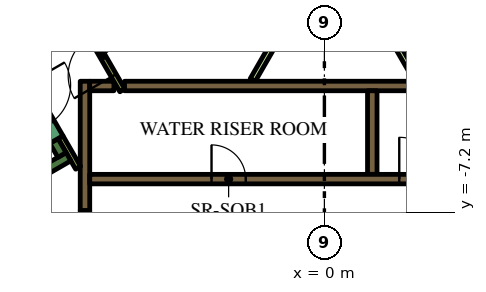
"""IFC4 building model, lengths in metres.
Left out: names, types, materials, properties, quantities, classifications, styles, units other than length and angle.
Written with IfcOpenShell. Run it as: python <this file> out.ifc"""

import sys

from ifc_helpers import new_model, si_unit, direction, frame, frame_2d, origin, place, context, subcontext, project, spatial, rectangle, extrude, element, fill, save


model = new_model("IFC4")
c1 = context("Model", 3, precision=1e-05, world=origin(), true_north=direction((0.0, 1.0)))
c2 = subcontext(c1, "Body", "Model", "MODEL_VIEW")
j1 = project(units=[si_unit("LENGTHUNIT", "METRE"), si_unit("PLANEANGLEUNIT", "RADIAN")], contexts=[c1])
p1 = place(None, origin())
s1 = spatial("IfcSite", under=j1, at=p1, CompositionType="ELEMENT")
p2 = place(p1, origin())
s2 = spatial("IfcBuilding", under=s1, at=p2, CompositionType="ELEMENT")
p3 = place(p2, frame((0.0, 0.0, 114.9)))
s3 = spatial("IfcBuildingStorey", under=s2, at=p3, CompositionType="ELEMENT", Elevation=114.9)
p4 = place(p3, frame((-12.84, -9.261, 0.0), z_axis=(0.0, 0.0, 1.0), x_axis=(0.866016039709, 0.500016218704, 0.0)))
e1 = element("IfcWall", 1, at=p4, inside=s3, PredefinedType="SOLIDWALL", context=c2, shape_type="SweptSolid", body=[
    extrude(rectangle(XDim=7.05, YDim=0.25, at=frame_2d((3.525, 0.0))), origin(), (0.0, 0.0, 1.0), 3.9),
])
p5 = place(p3, frame((-6.905, -5.69, 0.0), z_axis=(0.0, 0.0, 1.0), x_axis=(-0.500402024738, 0.865793170242, 0.0)))
e2 = element("IfcWall", 2, at=p5, inside=s3, PredefinedType="SOLIDWALL", context=c2, shape_type="SweptSolid", body=[
    extrude(rectangle(XDim=0.425, YDim=0.25, at=frame_2d((0.212, 0.0))), origin(), (0.0, 0.0, 1.0), 3.9),
])
p6 = place(p3, frame((-5.259, -3.875, 0.0), z_axis=(0.0, 0.0, 1.0), x_axis=(1.0, 0.0, 0.0)))
e3 = element("IfcWall", 3, at=p6, inside=s3, PredefinedType="SOLIDWALL", context=c2, shape_type="SweptSolid", body=[
    extrude(rectangle(XDim=10.489, YDim=0.25, at=frame_2d((5.244, 0.0))), origin(), (0.0, 0.0, 1.0), 3.9),
])
p7 = place(p3, frame((1.26, -4.0, 0.0), z_axis=(0.0, 0.0, 1.0), x_axis=(0.0, -1.0, 0.0)))
e4 = element("IfcWall", 4, at=p7, inside=s3, PredefinedType="SOLIDWALL", context=c2, shape_type="SweptSolid", body=[
    extrude(rectangle(XDim=2.2, YDim=0.25, at=frame_2d((1.1, 0.0))), origin(), (0.0, 0.0, 1.0), 3.9),
])
p8 = place(p3, frame((-6.3, -3.75, 0.0), z_axis=(0.0, 0.0, 1.0), x_axis=(0.0, -1.0, 0.0)))
e5 = element("IfcWall", 5, at=p8, inside=s3, PredefinedType="SOLIDWALL", context=c2, shape_type="SweptSolid", body=[
    extrude(rectangle(XDim=3.404, YDim=0.25, at=frame_2d((1.702, 0.0))), origin(), (0.0, 0.0, 1.0), 3.9),
])
p9 = place(p3, frame((-6.175, -3.875, 0.0), z_axis=(0.0, 0.0, 1.0), x_axis=(1.0, 0.0, 0.0)))
e6 = element("IfcWall", 6, at=p9, inside=s3, PredefinedType="SOLIDWALL", context=c2, shape_type="SweptSolid", body=[
    extrude(rectangle(XDim=0.637, YDim=0.25, at=frame_2d((0.318, 0.0))), origin(), (0.0, 0.0, 1.0), 3.9),
])
p10 = place(p3, frame((-6.48, -6.027, 0.0), z_axis=(0.0, 0.0, 1.0), x_axis=(-0.499927229454, 0.866067413802, 0.0)))
e7 = element("IfcWall", 7, at=p10, inside=s3, PredefinedType="PARTITIONING", context=c2, shape_type="SweptSolid", body=[
    extrude(rectangle(XDim=0.929, YDim=0.15, at=frame_2d((0.464, 0.0))), origin(), (0.0, 0.0, 1.0), 3.9),
])
p11 = place(p3, frame((-1.887, -3.718, 0.0), z_axis=(0.0, 0.0, 1.0), x_axis=(0.500057179532, 0.865992388649, 0.0)))
e8 = element("IfcWall", 8, at=p11, inside=s3, PredefinedType="PARTITIONING", context=c2, shape_type="SweptSolid", body=[
    extrude(rectangle(XDim=1.199, YDim=0.15, at=frame_2d((0.6, 0.0))), origin(), (0.0, 0.0, 1.0), 2.75),
])
p12 = place(p3, frame((2.435, -3.718, 0.0), z_axis=(0.0, 0.0, 1.0), x_axis=(-0.499985176046, 0.866033962229, 0.0)))
e9 = element("IfcWall", 9, at=p12, inside=s3, PredefinedType="PARTITIONING", context=c2, shape_type="SweptSolid", body=[
    extrude(rectangle(XDim=8.875, YDim=0.15, at=frame_2d((4.438, 0.0))), origin(), (0.0, 0.0, 1.0), 2.75),
])
p13 = place(p3, frame((-6.175, -6.325, 0.0), z_axis=(0.0, 0.0, 1.0), x_axis=(1.0, 0.0, 0.0)))
e10 = element("IfcWall", 10, at=p13, inside=s3, PredefinedType="SOLIDWALL", context=c2, shape_type="SweptSolid", body=[
    extrude(rectangle(XDim=12.35, YDim=0.25, at=frame_2d((6.175, 0.0))), origin(), (0.0, 0.0, 1.0), 3.9),
])
p14 = place(p13, frame((3.205, 0.0, 0.0)))
e11 = element("IfcOpeningElement", 11, at=p14, cuts=e10, PredefinedType="OPENING", context=c2, shape_type="SweptSolid", body=[
    extrude(rectangle(XDim=0.9, YDim=2.1, at=frame_2d((0.45, 1.05))), frame((0.0, 0.135, 0.0), z_axis=(0.0, -1.0, 0.0), x_axis=(1.0, 0.0, 0.0)), (0.0, 0.0, 1.0), 0.27),
])
p15 = place(p13, frame((8.145, 0.0, 0.0)))
e12 = element("IfcOpeningElement", 12, at=p15, cuts=e10, PredefinedType="OPENING", context=c2, shape_type="SweptSolid", body=[
    extrude(rectangle(XDim=1.1, YDim=2.1, at=frame_2d((0.55, 1.05))), frame((0.0, 0.135, 0.0), z_axis=(0.0, -1.0, 0.0), x_axis=(1.0, 0.0, 0.0)), (0.0, 0.0, 1.0), 0.27),
])
p16 = place(p13, frame((10.665, 0.0, 0.0)))
e13 = element("IfcOpeningElement", 13, at=p16, cuts=e10, PredefinedType="OPENING", context=c2, shape_type="SweptSolid", body=[
    extrude(rectangle(XDim=1.1, YDim=2.1, at=frame_2d((0.55, 1.05))), frame((0.0, 0.135, 0.0), z_axis=(0.0, -1.0, 0.0), x_axis=(1.0, 0.0, 0.0)), (0.0, 0.0, 1.0), 0.27),
])
p17 = place(p3, frame((-8.103, -3.466, 0.0), z_axis=(0.0, 0.0, 1.0), x_axis=(0.500078061341, -0.865980330357, 0.0)))
e14 = element("IfcWall", 14, at=p17, inside=s3, PredefinedType="SOLIDWALL", context=c2, shape_type="SweptSolid", body=[
    extrude(rectangle(XDim=2.1, YDim=0.4, at=frame_2d((1.05, 0.0))), origin(), (0.0, 0.0, 1.0), 3.9),
])
p18 = place(p17, frame((0.45, 0.0, 0.0)))
e15 = element("IfcOpeningElement", 15, at=p18, cuts=e14, PredefinedType="OPENING", context=c2, shape_type="SweptSolid", body=[
    extrude(rectangle(XDim=1.2, YDim=2.1, at=frame_2d((0.6, 1.05))), frame((0.0, 0.21, 0.0), z_axis=(0.0, -1.0, 0.0), x_axis=(1.0, 0.0, 0.0)), (0.0, 0.0, 1.0), 0.42),
])
p19 = place(p3, frame((-6.3, -7.154, 0.0), z_axis=(0.0, 0.0, 1.0), x_axis=(0.0, -1.0, 0.0)))
e16 = element("IfcWall", 16, at=p19, inside=s3, PredefinedType="SOLIDWALL", context=c2, shape_type="SweptSolid", body=[
    extrude(rectangle(XDim=1.8, YDim=0.25, at=frame_2d((0.9, 0.0))), origin(), (0.0, 0.0, 1.0), 3.9),
])
p20 = place(p19, frame((0.45, 0.0, 0.0)))
e17 = element("IfcOpeningElement", 17, at=p20, cuts=e16, PredefinedType="OPENING", context=c2, shape_type="SweptSolid", body=[
    extrude(rectangle(XDim=0.9, YDim=2.1, at=frame_2d((0.45, 1.05))), frame((0.0, 0.135, 0.0), z_axis=(0.0, -1.0, 0.0), x_axis=(1.0, 0.0, 0.0)), (0.0, 0.0, 1.0), 0.27),
])
p21 = place(p3, frame((-5.317, -3.99, 0.0), z_axis=(0.0, 0.0, 1.0), x_axis=(-0.500027713859, 0.866009402589, 0.0)))
e18 = element("IfcWall", 18, at=p21, inside=s3, PredefinedType="PARTITIONING", context=c2, shape_type="SweptSolid", body=[
    extrude(rectangle(XDim=2.1, YDim=0.15, at=frame_2d((1.05, 0.0))), origin(), (0.0, 0.0, 1.0), 3.9),
])
p22 = place(p21, frame((0.45, 0.0, 0.0)))
e19 = element("IfcOpeningElement", 19, at=p22, cuts=e18, PredefinedType="OPENING", context=c2, shape_type="SweptSolid", body=[
    extrude(rectangle(XDim=1.2, YDim=2.1, at=frame_2d((0.6, 1.05))), frame((0.0, 0.085, 0.0), z_axis=(0.0, -1.0, 0.0), x_axis=(1.0, 0.0, 0.0)), (0.0, 0.0, 1.0), 0.17),
])
p23 = place(p3, frame((-19.081, -3.9, 0.0), z_axis=(0.0, 0.0, 1.0), x_axis=(0.499998313975, 0.866026377209, 0.0)))
e20 = element("IfcWall", 20, at=p23, inside=s3, PredefinedType="PARTITIONING", context=c2, shape_type="SweptSolid", body=[
    extrude(rectangle(XDim=25.766, YDim=0.15, at=frame_2d((12.883, 0.0))), origin(), (0.0, 0.0, 1.0), 2.75),
])
p24 = place(p23, frame((19.306, 0.0, 0.0)))
e21 = element("IfcOpeningElement", 21, at=p24, cuts=e20, PredefinedType="OPENING", context=c2, shape_type="SweptSolid", body=[
    extrude(rectangle(XDim=1.0, YDim=2.1, at=frame_2d((0.5, 1.05))), frame((0.0, 0.085, 0.0), z_axis=(0.0, -1.0, 0.0), x_axis=(1.0, 0.0, 0.0)), (0.0, 0.0, 1.0), 0.17),
])
p25 = place(p23, frame((18.0, 0.0, 0.0)))
e22 = element("IfcOpeningElement", 22, at=p25, cuts=e20, PredefinedType="OPENING", context=c2, shape_type="SweptSolid", body=[
    extrude(rectangle(XDim=1.0, YDim=2.1, at=frame_2d((0.5, 1.05))), frame((0.0, 0.085, 0.0), z_axis=(0.0, -1.0, 0.0), x_axis=(1.0, 0.0, 0.0)), (0.0, 0.0, 1.0), 0.17),
])
p26 = place(p23, frame((6.838, 0.0, 0.0)))
e23 = element("IfcOpeningElement", 23, at=p26, cuts=e20, PredefinedType="OPENING", context=c2, shape_type="SweptSolid", body=[
    extrude(rectangle(XDim=1.0, YDim=2.1, at=frame_2d((0.5, 1.05))), frame((0.0, 0.085, 0.0), z_axis=(0.0, -1.0, 0.0), x_axis=(1.0, 0.0, 0.0)), (0.0, 0.0, 1.0), 0.17),
])
p27 = place(p23, frame((4.674, 0.0, 0.0)))
e24 = element("IfcOpeningElement", 24, at=p27, cuts=e20, PredefinedType="OPENING", context=c2, shape_type="SweptSolid", body=[
    extrude(rectangle(XDim=0.9, YDim=2.1, at=frame_2d((0.45, 1.05))), frame((0.0, 0.085, 0.0), z_axis=(0.0, -1.0, 0.0), x_axis=(1.0, 0.0, 0.0)), (0.0, 0.0, 1.0), 0.17),
])
p28 = place(p23, frame((0.18, 0.0, 0.0)))
e25 = element("IfcOpeningElement", 25, at=p28, cuts=e20, PredefinedType="OPENING", context=c2, shape_type="SweptSolid", body=[
    extrude(rectangle(XDim=1.0, YDim=2.1, at=frame_2d((0.5, 1.05))), frame((0.0, 0.085, 0.0), z_axis=(0.0, -1.0, 0.0), x_axis=(1.0, 0.0, 0.0)), (0.0, 0.0, 1.0), 0.17),
])
p29 = place(p14, origin())
e26 = element("IfcDoor", 26, at=p29, inside=s3, OperationType="SINGLE_SWING_LEFT", PredefinedType="DOOR", context=c2, shape_type="SweptSolid", body=[
    extrude(rectangle(XDim=0.9, YDim=2.1, at=frame_2d((0.45, 1.05))), frame((0.0, 0.025, 0.0), z_axis=(0.0, -1.0, 0.0), x_axis=(1.0, 0.0, 0.0)), (0.0, 0.0, 1.0), 0.05),
])
fill(e11, e26)
p30 = place(p15, origin())
e27 = element("IfcDoor", 27, at=p30, inside=s3, OperationType="DOUBLE_DOOR_SLIDING", PredefinedType="DOOR", context=c2, shape_type="SweptSolid", body=[
    extrude(rectangle(XDim=1.1, YDim=2.1, at=frame_2d((0.55, 1.05))), frame((0.0, 0.025, 0.0), z_axis=(0.0, -1.0, 0.0), x_axis=(1.0, 0.0, 0.0)), (0.0, 0.0, 1.0), 0.05),
])
fill(e12, e27)
p31 = place(p22, origin())
e28 = element("IfcDoor", 28, at=p31, inside=s3, OperationType="SINGLE_SWING_LEFT", PredefinedType="DOOR", context=c2, shape_type="SweptSolid", body=[
    extrude(rectangle(XDim=1.2, YDim=2.1, at=frame_2d((0.6, 1.05))), frame((0.0, 0.025, 0.0), z_axis=(0.0, -1.0, 0.0), x_axis=(1.0, 0.0, 0.0)), (0.0, 0.0, 1.0), 0.05),
])
fill(e19, e28)
save(model, sys.argv[1])
